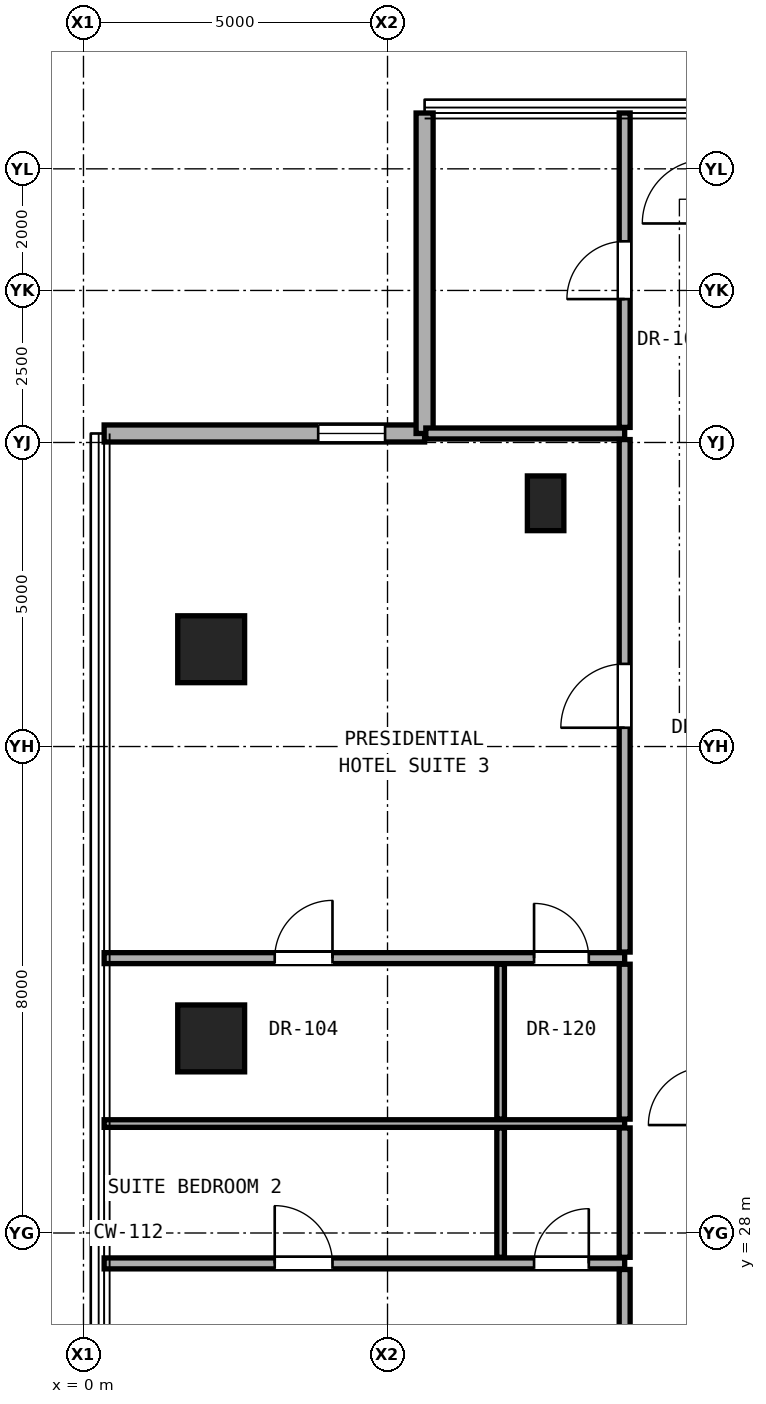
"""IFC4 building model, lengths in metres.
Left out: names, types, materials, properties, quantities, classifications, styles, units other than length and angle.
Written with IfcOpenShell. Run it as: python <this file> out.ifc"""

import sys

from ifc_helpers import new_model, si_unit, direction, frame, frame_2d, origin, origin_2d, place, context, subcontext, project, spatial, rectangle, hollow_rectangle, extrude, element, fill, save


model = new_model("IFC4")
c1 = context("Model", 3, precision=1e-05, world=origin(), true_north=direction((0.0, 1.0)))
c2 = subcontext(c1, "Body", "Model", "MODEL_VIEW")
j1 = project(units=[si_unit("LENGTHUNIT", "METRE"), si_unit("PLANEANGLEUNIT", "RADIAN")], contexts=[c1])
p1 = place(None, origin())
s1 = spatial("IfcSite", under=j1, at=p1, CompositionType="ELEMENT")
p2 = place(p1, origin())
s2 = spatial("IfcBuilding", under=s1, at=p2, CompositionType="ELEMENT")
p3 = place(p2, frame((0.0, 0.0, 121.4)))
s3 = spatial("IfcBuildingStorey", under=s2, at=p3, CompositionType="ELEMENT", Elevation=121.4)
for number, where, z_axis, x_axis in (
    (1, (2.1, 31.2, 0.0), (0.0, 0.0, 1.0), (1.0, 0.0, 0.0)),
    (2, (2.1, 37.6, 0.0), (0.0, 0.0, 1.0), (1.0, 0.0, 0.0)),
):
    element("IfcColumn", number, at=place(p3, frame(where, z_axis=z_axis, x_axis=x_axis)), inside=s3, PredefinedType="COLUMN", context=c2, shape_type="SweptSolid", body=[
        extrude(hollow_rectangle(XDim=1.1, YDim=1.1, WallThickness=0.06, at=origin_2d()), origin(), (0.0, 0.0, 1.0), 3.3),
    ])
p4 = place(p3, frame((7.6, 40.0, 0.0), z_axis=(0.0, 0.0, 1.0), x_axis=(1.0, 0.0, 0.0)))
e3 = element("IfcColumn", 3, at=p4, inside=s3, PredefinedType="PILASTER", context=c2, shape_type="SweptSolid", body=[
    extrude(rectangle(XDim=0.6, YDim=0.9, at=origin_2d()), origin(), (0.0, 0.0, 1.0), 3.3),
])
p5 = place(p3, frame((5.61, 41.148, 0.0), z_axis=(0.0, 0.0, 1.0), x_axis=(-1.0, 0.0, 0.0)))
e4 = element("IfcWall", 4, at=p5, inside=s3, PredefinedType="SOLIDWALL", context=c2, shape_type="SweptSolid", body=[
    extrude(rectangle(XDim=5.27, YDim=0.28, at=frame_2d((2.635, 0.0))), origin(), (0.0, 0.0, 1.0), 3.06),
])
p6 = place(p5, frame((0.65, 0.0, 0.85)))
e5 = element("IfcOpeningElement", 5, at=p6, cuts=e4, PredefinedType="OPENING", context=c2, shape_type="SweptSolid", body=[
    extrude(rectangle(XDim=1.1, YDim=2.0, at=frame_2d((0.55, 1.0))), frame((0.0, 0.15, 0.0), z_axis=(0.0, -1.0, 0.0), x_axis=(1.0, 0.0, 0.0)), (0.0, 0.0, 1.0), 0.3),
])
p7 = place(p3, frame((5.61, 46.418, 0.0), z_axis=(0.0, 0.0, 1.0), x_axis=(0.0, -1.0, 0.0)))
e6 = element("IfcWall", 6, at=p7, inside=s3, PredefinedType="SOLIDWALL", context=c2, shape_type="SweptSolid", body=[
    extrude(rectangle(XDim=5.27, YDim=0.28, at=frame_2d((2.635, 0.0))), origin(), (0.0, 0.0, 1.0), 3.06),
])
p8 = place(p3, frame((0.34, 27.5, 0.0), z_axis=(0.0, 0.0, 1.0), x_axis=(1.0, 0.0, 0.0)))
e7 = element("IfcWall", 7, at=p8, inside=s3, PredefinedType="PARTITIONING", context=c2, shape_type="SweptSolid", body=[
    extrude(rectangle(XDim=8.56, YDim=0.18, at=frame_2d((4.28, 0.0))), origin(), (0.0, 0.0, 1.0), 2.299),
])
p9 = place(p8, frame((2.805, 0.0, 0.0)))
e8 = element("IfcOpeningElement", 8, at=p9, cuts=e7, PredefinedType="OPENING", context=c2, shape_type="SweptSolid", body=[
    extrude(rectangle(XDim=0.95, YDim=2.15, at=frame_2d((0.475, 1.075))), frame((0.0, 0.1, 0.0), z_axis=(0.0, -1.0, 0.0), x_axis=(1.0, 0.0, 0.0)), (0.0, 0.0, 1.0), 0.2),
])
p10 = place(p8, frame((7.07, 0.0, 0.0)))
e9 = element("IfcOpeningElement", 9, at=p10, cuts=e7, PredefinedType="OPENING", context=c2, shape_type="SweptSolid", body=[
    extrude(rectangle(XDim=0.9, YDim=2.1, at=frame_2d((0.45, 1.05))), frame((0.0, 0.1, 0.0), z_axis=(0.0, -1.0, 0.0), x_axis=(1.0, 0.0, 0.0)), (0.0, 0.0, 1.0), 0.2),
])
p11 = place(p3, frame((0.34, 29.8, 0.0), z_axis=(0.0, 0.0, 1.0), x_axis=(1.0, 0.0, 0.0)))
e10 = element("IfcWall", 10, at=p11, inside=s3, PredefinedType="PARTITIONING", context=c2, shape_type="SweptSolid", body=[
    extrude(rectangle(XDim=8.56, YDim=0.125, at=frame_2d((4.28, 0.0))), origin(), (0.0, 0.0, 1.0), 2.299),
])
p12 = place(p3, frame((0.34, 32.52, 0.0), z_axis=(0.0, 0.0, 1.0), x_axis=(1.0, 0.0, 0.0)))
e11 = element("IfcWall", 11, at=p12, inside=s3, PredefinedType="PARTITIONING", context=c2, shape_type="SweptSolid", body=[
    extrude(rectangle(XDim=8.56, YDim=0.18, at=frame_2d((4.28, 0.0))), origin(), (0.0, 0.0, 1.0), 2.299),
])
p13 = place(p12, frame((2.805, 0.0, 0.0)))
e12 = element("IfcOpeningElement", 12, at=p13, cuts=e11, PredefinedType="OPENING", context=c2, shape_type="SweptSolid", body=[
    extrude(rectangle(XDim=0.95, YDim=2.15, at=frame_2d((0.475, 1.075))), frame((0.0, 0.1, 0.0), z_axis=(0.0, -1.0, 0.0), x_axis=(1.0, 0.0, 0.0)), (0.0, 0.0, 1.0), 0.2),
])
p14 = place(p12, frame((7.07, 0.0, 0.0)))
e13 = element("IfcOpeningElement", 13, at=p14, cuts=e11, PredefinedType="OPENING", context=c2, shape_type="SweptSolid", body=[
    extrude(rectangle(XDim=0.9, YDim=2.1, at=frame_2d((0.45, 1.05))), frame((0.0, 0.1, 0.0), z_axis=(0.0, -1.0, 0.0), x_axis=(1.0, 0.0, 0.0)), (0.0, 0.0, 1.0), 0.2),
])
p15 = place(p3, frame((5.63, 41.148, 0.0), z_axis=(0.0, 0.0, 1.0), x_axis=(1.0, 0.0, 0.0)))
e14 = element("IfcWall", 14, at=p15, inside=s3, PredefinedType="PARTITIONING", context=c2, shape_type="SweptSolid", body=[
    extrude(rectangle(XDim=3.27, YDim=0.18, at=frame_2d((1.635, 0.0))), origin(), (0.0, 0.0, 1.0), 3.08),
])
p16 = place(p3, frame((6.86, 27.6, 0.0), z_axis=(0.0, 0.0, 1.0), x_axis=(0.0, 1.0, 0.0)))
e15 = element("IfcWall", 15, at=p16, inside=s3, PredefinedType="PARTITIONING", context=c2, shape_type="SweptSolid", body=[
    extrude(rectangle(XDim=2.127, YDim=0.125, at=frame_2d((1.064, 0.0))), origin(), (0.0, 0.0, 1.0), 3.08),
])
p17 = place(p3, frame((6.86, 29.873, 0.0), z_axis=(0.0, 0.0, 1.0), x_axis=(0.0, 1.0, 0.0)))
e16 = element("IfcWall", 16, at=p17, inside=s3, PredefinedType="PARTITIONING", context=c2, shape_type="SweptSolid", body=[
    extrude(rectangle(XDim=2.547, YDim=0.125, at=frame_2d((1.274, 0.0))), origin(), (0.0, 0.0, 1.0), 2.299),
])
p18 = place(p3, frame((8.9, 23.061, 0.0), z_axis=(0.0, 0.0, 1.0), x_axis=(0.0, 1.0, 0.0)))
e17 = element("IfcWall", 17, at=p18, inside=s3, PredefinedType="PARTITIONING", context=c2, shape_type="SweptSolid", body=[
    extrude(rectangle(XDim=4.339, YDim=0.18, at=frame_2d((2.169, 0.0))), origin(), (0.0, 0.0, 1.0), 2.299),
])
p19 = place(p18, frame((1.645, 0.0, 0.0)))
e18 = element("IfcOpeningElement", 18, at=p19, cuts=e17, PredefinedType="OPENING", context=c2, shape_type="SweptSolid", body=[
    extrude(rectangle(XDim=1.05, YDim=2.2, at=frame_2d((0.525, 1.1))), frame((0.0, 0.1, 0.0), z_axis=(0.0, -1.0, 0.0), x_axis=(1.0, 0.0, 0.0)), (0.0, 0.0, 1.0), 0.2),
])
p20 = place(p3, frame((8.9, 27.6, 0.0), z_axis=(0.0, 0.0, 1.0), x_axis=(0.0, 1.0, 0.0)))
e19 = element("IfcWall", 19, at=p20, inside=s3, PredefinedType="PARTITIONING", context=c2, shape_type="SweptSolid", body=[
    extrude(rectangle(XDim=2.127, YDim=0.18, at=frame_2d((1.064, 0.0))), origin(), (0.0, 0.0, 1.0), 3.08),
])
p21 = place(p3, frame((8.9, 29.873, 0.0), z_axis=(0.0, 0.0, 1.0), x_axis=(0.0, 1.0, 0.0)))
e20 = element("IfcWall", 20, at=p21, inside=s3, PredefinedType="PARTITIONING", context=c2, shape_type="SweptSolid", body=[
    extrude(rectangle(XDim=2.547, YDim=0.18, at=frame_2d((1.274, 0.0))), origin(), (0.0, 0.0, 1.0), 2.299),
])
p22 = place(p3, frame((8.9, 32.62, 0.0), z_axis=(0.0, 0.0, 1.0), x_axis=(0.0, 1.0, 0.0)))
e21 = element("IfcWall", 21, at=p22, inside=s3, PredefinedType="PARTITIONING", context=c2, shape_type="SweptSolid", body=[
    extrude(rectangle(XDim=8.428, YDim=0.18, at=frame_2d((4.214, 0.0))), origin(), (0.0, 0.0, 1.0), 2.456),
])
p23 = place(p22, frame((3.689, 0.0, 0.0)))
e22 = element("IfcOpeningElement", 22, at=p23, cuts=e21, PredefinedType="OPENING", context=c2, shape_type="SweptSolid", body=[
    extrude(rectangle(XDim=1.05, YDim=2.2, at=frame_2d((0.525, 1.1))), frame((0.0, 0.1, 0.0), z_axis=(0.0, -1.0, 0.0), x_axis=(1.0, 0.0, 0.0)), (0.0, 0.0, 1.0), 0.2),
])
p24 = place(p3, frame((8.9, 41.248, 0.0), z_axis=(0.0, 0.0, 1.0), x_axis=(0.0, 1.0, 0.0)))
e23 = element("IfcWall", 23, at=p24, inside=s3, PredefinedType="PARTITIONING", context=c2, shape_type="SweptSolid", body=[
    extrude(rectangle(XDim=5.17, YDim=0.18, at=frame_2d((2.585, 0.0))), origin(), (0.0, 0.0, 1.0), 3.08),
])
p25 = place(p24, frame((2.11, 0.0, 0.0)))
e24 = element("IfcOpeningElement", 24, at=p25, cuts=e23, PredefinedType="OPENING", context=c2, shape_type="SweptSolid", body=[
    extrude(rectangle(XDim=0.95, YDim=2.15, at=frame_2d((0.475, 1.075))), frame((0.0, 0.1, 0.0), z_axis=(0.0, -1.0, 0.0), x_axis=(1.0, 0.0, 0.0)), (0.0, 0.0, 1.0), 0.2),
])
p26 = place(p6, origin())
e25 = element("IfcWindow", 25, at=p26, inside=s3, PartitioningType="SINGLE_PANEL", PredefinedType="WINDOW", context=c2, shape_type="SweptSolid", body=[
    extrude(rectangle(XDim=1.1, YDim=2.0, at=frame_2d((0.55, 1.0))), frame((0.0, 0.03, 0.0), z_axis=(0.0, -1.0, 0.0), x_axis=(1.0, 0.0, 0.0)), (0.0, 0.0, 1.0), 0.06),
])
fill(e5, e25)
p27 = place(p9, origin())
e26 = element("IfcDoor", 26, at=p27, inside=s3, OperationType="SINGLE_SWING_LEFT", PredefinedType="DOOR", context=c2, shape_type="SweptSolid", body=[
    extrude(rectangle(XDim=0.95, YDim=2.15, at=frame_2d((0.475, 1.075))), frame((0.0, 0.025, 0.0), z_axis=(0.0, -1.0, 0.0), x_axis=(1.0, 0.0, 0.0)), (0.0, 0.0, 1.0), 0.05),
])
fill(e8, e26)
p28 = place(p10, origin())
e27 = element("IfcDoor", 27, at=p28, inside=s3, OperationType="SINGLE_SWING_RIGHT", PredefinedType="DOOR", context=c2, shape_type="SweptSolid", body=[
    extrude(rectangle(XDim=0.9, YDim=2.1, at=frame_2d((0.45, 1.05))), frame((0.0, 0.025, 0.0), z_axis=(0.0, -1.0, 0.0), x_axis=(1.0, 0.0, 0.0)), (0.0, 0.0, 1.0), 0.05),
])
fill(e9, e27)
p29 = place(p23, origin())
e28 = element("IfcDoor", 28, at=p29, inside=s3, OperationType="SINGLE_SWING_LEFT", PredefinedType="DOOR", context=c2, shape_type="SweptSolid", body=[
    extrude(rectangle(XDim=1.05, YDim=2.2, at=frame_2d((0.525, 1.1))), frame((0.0, 0.025, 0.0), z_axis=(0.0, -1.0, 0.0), x_axis=(1.0, 0.0, 0.0)), (0.0, 0.0, 1.0), 0.05),
])
fill(e22, e28)
p30 = place(p13, origin())
e29 = element("IfcDoor", 29, at=p30, inside=s3, OperationType="SINGLE_SWING_RIGHT", PredefinedType="DOOR", context=c2, shape_type="SweptSolid", body=[
    extrude(rectangle(XDim=0.95, YDim=2.15, at=frame_2d((0.475, 1.075))), frame((0.0, 0.025, 0.0), z_axis=(0.0, -1.0, 0.0), x_axis=(1.0, 0.0, 0.0)), (0.0, 0.0, 1.0), 0.05),
])
fill(e12, e29)
p31 = place(p14, origin())
e30 = element("IfcDoor", 30, at=p31, inside=s3, OperationType="SINGLE_SWING_LEFT", PredefinedType="DOOR", context=c2, shape_type="SweptSolid", body=[
    extrude(rectangle(XDim=0.9, YDim=2.1, at=frame_2d((0.45, 1.05))), frame((0.0, 0.025, 0.0), z_axis=(0.0, -1.0, 0.0), x_axis=(1.0, 0.0, 0.0)), (0.0, 0.0, 1.0), 0.05),
])
fill(e13, e30)
p32 = place(p25, origin())
e31 = element("IfcDoor", 31, at=p32, inside=s3, OperationType="SINGLE_SWING_LEFT", PredefinedType="DOOR", context=c2, shape_type="SweptSolid", body=[
    extrude(rectangle(XDim=0.95, YDim=2.15, at=frame_2d((0.475, 1.075))), frame((0.0, 0.025, 0.0), z_axis=(0.0, -1.0, 0.0), x_axis=(1.0, 0.0, 0.0)), (0.0, 0.0, 1.0), 0.05),
])
fill(e24, e31)
save(model, sys.argv[1])
